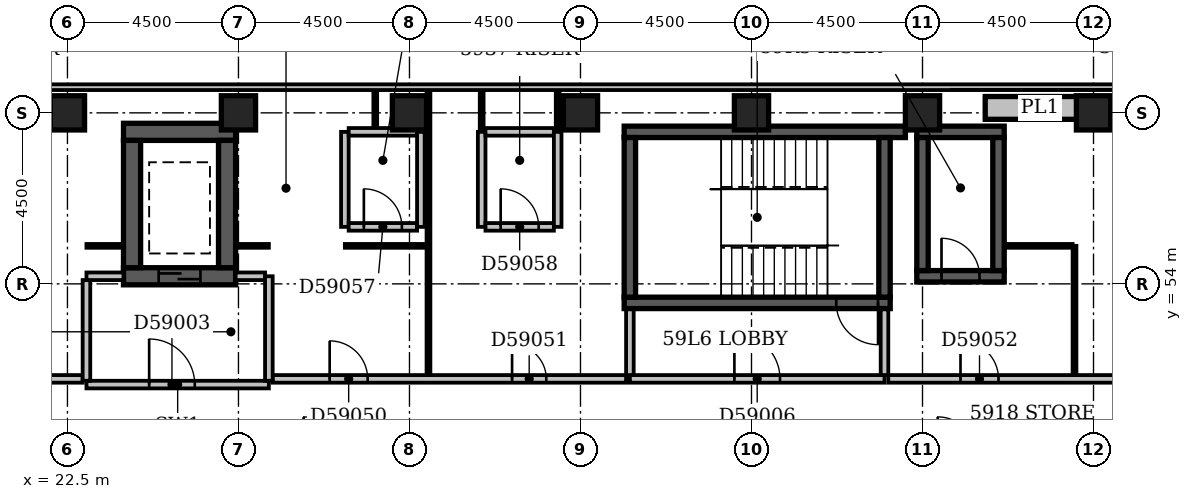
"""IFC4 building model, lengths in metres.
Left out: names, types, materials, properties, quantities, classifications, styles, units other than length and angle.
Written with IfcOpenShell. Run it as: python <this file> out.ifc"""

import sys

from ifc_helpers import new_model, si_unit, direction, frame, frame_2d, origin, origin_2d, place, context, subcontext, project, spatial, rectangle, extrude, element, fill, save


model = new_model("IFC4")
c1 = context("Model", 3, precision=1e-05, world=origin(), true_north=direction((0.0, 1.0)))
c2 = subcontext(c1, "Body", "Model", "MODEL_VIEW")
j1 = project(units=[si_unit("LENGTHUNIT", "METRE"), si_unit("PLANEANGLEUNIT", "RADIAN")], contexts=[c1])
p1 = place(None, origin())
s1 = spatial("IfcSite", under=j1, at=p1, CompositionType="ELEMENT")
p2 = place(p1, origin())
s2 = spatial("IfcBuilding", under=s1, at=p2, CompositionType="ELEMENT")
p3 = place(p2, frame((0.0, 0.0, 229.4)))
s3 = spatial("IfcBuildingStorey", under=s2, at=p3, CompositionType="ELEMENT", Elevation=229.4)
p4 = place(p3, frame((23.975, 54.2, -0.3), z_axis=(0.0, 0.0, 1.0), x_axis=(1.0, 0.0, 0.0)))
e1 = element("IfcWall", 1, at=p4, inside=s3, PredefinedType="SHEAR", context=c2, shape_type="SweptSolid", body=[
    extrude(rectangle(XDim=2.95, YDim=0.45, at=frame_2d((1.475, 0.0))), origin(), (0.0, 0.0, 1.0), 3.55),
])
p5 = place(p4, frame((0.925, 0.0, 0.3)))
e2 = element("IfcOpeningElement", 2, at=p5, cuts=e1, PredefinedType="OPENING", context=c2, shape_type="SweptSolid", body=[
    extrude(rectangle(XDim=1.1, YDim=2.1, at=frame_2d((0.55, 1.05))), frame((0.0, 0.237, 0.0), z_axis=(0.0, -1.0, 0.0), x_axis=(1.0, 0.0, 0.0)), (0.0, 0.0, 1.0), 0.474),
])
p6 = place(p3, frame((23.975, 58.0, -0.3), z_axis=(0.0, 0.0, 1.0), x_axis=(1.0, 0.0, 0.0)))
e3 = element("IfcWall", 3, at=p6, inside=s3, PredefinedType="SHEAR", context=c2, shape_type="SweptSolid", body=[
    extrude(rectangle(XDim=2.95, YDim=0.45, at=frame_2d((1.475, 0.0))), origin(), (0.0, 0.0, 1.0), 3.55),
])
for number, where, z_axis, x_axis in (
    (4, (24.2, 54.425, -0.3), (0.0, 0.0, 1.0), (0.0, 1.0, 0.0)),
    (5, (26.7, 54.425, -0.3), (0.0, 0.0, 1.0), (0.0, 1.0, 0.0)),
):
    element("IfcWall", number, at=place(p3, frame(where, z_axis=z_axis, x_axis=x_axis)), inside=s3, PredefinedType="SHEAR", context=c2, shape_type="SweptSolid", body=[
        extrude(rectangle(XDim=3.35, YDim=0.45, at=frame_2d((1.675, 0.0))), origin(), (0.0, 0.0, 1.0), 3.55),
    ])
p7 = place(p3, frame((37.15, 53.5, -0.3), z_axis=(0.0, 0.0, 1.0), x_axis=(1.0, 0.0, 0.0)))
e6 = element("IfcWall", 6, at=p7, inside=s3, PredefinedType="SHEAR", context=c2, shape_type="SweptSolid", body=[
    extrude(rectangle(XDim=7.0, YDim=0.3, at=frame_2d((3.5, 0.0))), origin(), (0.0, 0.0, 1.0), 3.55),
])
p8 = place(p7, frame((5.58, 0.0, 0.3)))
e7 = element("IfcOpeningElement", 7, at=p8, cuts=e6, PredefinedType="OPENING", context=c2, shape_type="SweptSolid", body=[
    extrude(rectangle(XDim=1.1, YDim=2.1, at=frame_2d((0.55, 1.05))), frame((0.0, 0.162, 0.0), z_axis=(0.0, -1.0, 0.0), x_axis=(1.0, 0.0, 0.0)), (0.0, 0.0, 1.0), 0.324),
])
p9 = place(p3, frame((37.15, 58.0, -0.3), z_axis=(0.0, 0.0, 1.0), x_axis=(1.0, 0.0, 0.0)))
e8 = element("IfcWall", 8, at=p9, inside=s3, PredefinedType="SHEAR", context=c2, shape_type="SweptSolid", body=[
    extrude(rectangle(XDim=7.4, YDim=0.3, at=frame_2d((3.7, 0.0))), origin(), (0.0, 0.0, 1.0), 3.55),
])
for number, where, z_axis, x_axis in (
    (9, (37.3, 53.65, -0.3), (0.0, 0.0, 1.0), (0.0, 1.0, 0.0)),
    (10, (44.0, 53.65, -0.3), (0.0, 0.0, 1.0), (0.0, 1.0, 0.0)),
):
    element("IfcWall", number, at=place(p3, frame(where, z_axis=z_axis, x_axis=x_axis)), inside=s3, PredefinedType="SHEAR", context=c2, shape_type="SweptSolid", body=[
        extrude(rectangle(XDim=4.2, YDim=0.3, at=frame_2d((2.1, 0.0))), origin(), (0.0, 0.0, 1.0), 3.55),
    ])
p10 = place(p3, frame((44.85, 54.2, -0.3), z_axis=(0.0, 0.0, 1.0), x_axis=(1.0, 0.0, 0.0)))
e11 = element("IfcWall", 11, at=p10, inside=s3, PredefinedType="SHEAR", context=c2, shape_type="SweptSolid", body=[
    extrude(rectangle(XDim=2.3, YDim=0.3, at=frame_2d((1.15, 0.0))), origin(), (0.0, 0.0, 1.0), 3.55),
])
p11 = place(p10, frame((0.65, 0.0, 0.3)))
e12 = element("IfcOpeningElement", 12, at=p11, cuts=e11, PredefinedType="OPENING", context=c2, shape_type="SweptSolid", body=[
    extrude(rectangle(XDim=1.0, YDim=2.1, at=frame_2d((0.5, 1.05))), frame((0.0, 0.162, 0.0), z_axis=(0.0, -1.0, 0.0), x_axis=(1.0, 0.0, 0.0)), (0.0, 0.0, 1.0), 0.324),
])
p12 = place(p3, frame((44.85, 58.0, -0.3), z_axis=(0.0, 0.0, 1.0), x_axis=(1.0, 0.0, 0.0)))
e13 = element("IfcWall", 13, at=p12, inside=s3, PredefinedType="SHEAR", context=c2, shape_type="SweptSolid", body=[
    extrude(rectangle(XDim=2.3, YDim=0.3, at=frame_2d((1.15, 0.0))), origin(), (0.0, 0.0, 1.0), 3.55),
])
for number, where, z_axis, x_axis in (
    (14, (45.0, 54.35, -0.3), (0.0, 0.0, 1.0), (0.0, 1.0, 0.0)),
    (15, (47.0, 54.35, -0.3), (0.0, 0.0, 1.0), (0.0, 1.0, 0.0)),
):
    element("IfcWall", number, at=place(p3, frame(where, z_axis=z_axis, x_axis=x_axis)), inside=s3, PredefinedType="SHEAR", context=c2, shape_type="SweptSolid", body=[
        extrude(rectangle(XDim=3.5, YDim=0.3, at=frame_2d((1.75, 0.0))), origin(), (0.0, 0.0, 1.0), 3.55),
    ])
for number, where, z_axis, x_axis in (
    (16, (22.5, 58.5, -0.3), (0.0, 0.0, 1.0), (1.0, 0.0, 0.0)),
    (17, (27.0, 58.5, -0.3), (0.0, 0.0, 1.0), (1.0, 0.0, 0.0)),
    (18, (31.5, 58.5, -0.3), (0.0, 0.0, 1.0), (1.0, 0.0, 0.0)),
    (19, (36.0, 58.5, -0.3), (0.0, 0.0, 1.0), (1.0, 0.0, 0.0)),
    (20, (40.5, 58.5, -0.3), (0.0, 0.0, 1.0), (1.0, 0.0, 0.0)),
    (21, (45.0, 58.5, -0.3), (0.0, 0.0, 1.0), (1.0, 0.0, 0.0)),
    (22, (49.5, 58.5, -0.3), (0.0, 0.0, 1.0), (1.0, 0.0, 0.0)),
):
    element("IfcColumn", number, at=place(p3, frame(where, z_axis=z_axis, x_axis=x_axis)), inside=s3, PredefinedType="COLUMN", context=c2, shape_type="SweptSolid", body=[
        extrude(rectangle(XDim=0.9, YDim=0.9, at=origin_2d()), origin(), (0.0, 0.0, 1.0), 3.55),
    ])
p13 = place(p3, frame((50.1, 59.175, 0.0), z_axis=(0.0, 0.0, 1.0), x_axis=(-1.0, 0.0, 0.0)))
e23 = element("IfcWall", 23, at=p13, inside=s3, PredefinedType="STANDARD", context=c2, shape_type="SweptSolid", body=[
    extrude(rectangle(XDim=50.85, YDim=0.15, at=frame_2d((25.425, 0.0))), origin(), (0.0, 0.0, 1.0), 2.7),
])
p14 = place(p3, frame((46.65, 58.63, 3.6), z_axis=(0.0, 0.0, 1.0), x_axis=(1.0, 0.0, 0.0)))
e24 = element("IfcWall", 24, at=p14, inside=s3, PredefinedType="STANDARD", context=c2, shape_type="SweptSolid", body=[
    extrude(rectangle(XDim=2.88, YDim=0.6, at=frame_2d((1.44, 0.0))), origin(), (0.0, 0.0, 1.0), 0.6),
])
p15 = place(p3, frame((23.0, 51.35, 0.0), z_axis=(0.0, 0.0, 1.0), x_axis=(1.0, 0.0, 0.0)))
e25 = element("IfcWall", 25, at=p15, inside=s3, PredefinedType="PARTITIONING", context=c2, shape_type="SweptSolid", body=[
    extrude(rectangle(XDim=4.8, YDim=0.2, at=frame_2d((2.4, 0.0))), origin(), (0.0, 0.0, 1.0), 3.25),
])
p16 = place(p15, frame((1.65, 0.0, 0.0)))
e26 = element("IfcOpeningElement", 26, at=p16, cuts=e25, PredefinedType="OPENING", context=c2, shape_type="SweptSolid", body=[
    extrude(rectangle(XDim=1.2, YDim=2.1, at=frame_2d((0.6, 1.05))), frame((0.0, 0.112, 0.0), z_axis=(0.0, -1.0, 0.0), x_axis=(1.0, 0.0, 0.0)), (0.0, 0.0, 1.0), 0.224),
])
p17 = place(p3, frame((27.8, 51.45, 0.0), z_axis=(0.0, 0.0, 1.0), x_axis=(0.0, 1.0, 0.0)))
e27 = element("IfcWall", 27, at=p17, inside=s3, PredefinedType="PARTITIONING", context=c2, shape_type="SweptSolid", body=[
    extrude(rectangle(XDim=2.75, YDim=0.2, at=frame_2d((1.375, 0.0))), origin(), (0.0, 0.0, 1.0), 3.25),
])
p18 = place(p3, frame((23.0, 54.2, 0.0), z_axis=(0.0, 0.0, 1.0), x_axis=(1.0, 0.0, 0.0)))
e28 = element("IfcWall", 28, at=p18, inside=s3, PredefinedType="PARTITIONING", context=c2, shape_type="SweptSolid", body=[
    extrude(rectangle(XDim=0.975, YDim=0.2, at=frame_2d((0.488, 0.0))), origin(), (0.0, 0.0, 1.0), 3.25),
])
p19 = place(p3, frame((26.925, 54.2, 0.0), z_axis=(0.0, 0.0, 1.0), x_axis=(1.0, 0.0, 0.0)))
e29 = element("IfcWall", 29, at=p19, inside=s3, PredefinedType="PARTITIONING", context=c2, shape_type="SweptSolid", body=[
    extrude(rectangle(XDim=0.775, YDim=0.2, at=frame_2d((0.387, 0.0))), origin(), (0.0, 0.0, 1.0), 3.25),
])
p20 = place(p3, frame((23.0, 51.45, 0.0), z_axis=(0.0, 0.0, 1.0), x_axis=(0.0, 1.0, 0.0)))
e30 = element("IfcWall", 30, at=p20, inside=s3, PredefinedType="PARTITIONING", context=c2, shape_type="SweptSolid", body=[
    extrude(rectangle(XDim=2.65, YDim=0.2, at=frame_2d((1.325, 0.0))), origin(), (0.0, 0.0, 1.0), 3.25),
])
p21 = place(p3, frame((37.3, 51.5, 0.0), z_axis=(0.0, 0.0, 1.0), x_axis=(1.0, 0.0, 0.0)))
e31 = element("IfcWall", 31, at=p21, inside=s3, PredefinedType="PARTITIONING", context=c2, shape_type="SweptSolid", body=[
    extrude(rectangle(XDim=6.7, YDim=0.2, at=frame_2d((3.35, 0.0))), origin(), (0.0, 0.0, 1.0), 3.25),
])
p22 = place(p21, frame((2.75, 0.0, 0.0)))
e32 = element("IfcOpeningElement", 32, at=p22, cuts=e31, PredefinedType="OPENING", context=c2, shape_type="SweptSolid", body=[
    extrude(rectangle(XDim=1.2, YDim=2.1, at=frame_2d((0.6, 1.05))), frame((0.0, 0.112, 0.0), z_axis=(0.0, -1.0, 0.0), x_axis=(1.0, 0.0, 0.0)), (0.0, 0.0, 1.0), 0.224),
])
for number, where, z_axis, x_axis in (
    (33, (44.0, 51.6, 0.0), (0.0, 0.0, 1.0), (0.0, 1.0, 0.0)),
    (34, (37.3, 51.6, 0.0), (0.0, 0.0, 1.0), (0.0, 1.0, 0.0)),
):
    element("IfcWall", number, at=place(p3, frame(where, z_axis=z_axis, x_axis=x_axis)), inside=s3, PredefinedType="PARTITIONING", context=c2, shape_type="SweptSolid", body=[
        extrude(rectangle(XDim=1.73, YDim=0.2, at=frame_2d((0.865, 0.0))), origin(), (0.0, 0.0, 1.0), 3.25),
    ])
p23 = place(p3, frame((7.6, 51.5, 0.0), z_axis=(0.0, 0.0, 1.0), x_axis=(1.0, 0.0, 0.0)))
e35 = element("IfcWall", 35, at=p23, inside=s3, PredefinedType="PARTITIONING", context=c2, shape_type="SweptSolid", body=[
    extrude(rectangle(XDim=15.3, YDim=0.2, at=frame_2d((7.65, 0.0))), origin(), (0.0, 0.0, 1.0), 3.25),
])
p24 = place(p23, frame((3.55, 0.0, 0.0)))
e36 = element("IfcOpeningElement", 36, at=p24, cuts=e35, PredefinedType="OPENING", context=c2, shape_type="SweptSolid", body=[
    extrude(rectangle(XDim=0.9, YDim=2.1, at=frame_2d((0.45, 1.05))), frame((0.0, 0.112, 0.0), z_axis=(0.0, -1.0, 0.0), x_axis=(1.0, 0.0, 0.0)), (0.0, 0.0, 1.0), 0.224),
])
p25 = place(p23, frame((11.3, 0.0, 0.0)))
e37 = element("IfcOpeningElement", 37, at=p25, cuts=e35, PredefinedType="OPENING", context=c2, shape_type="SweptSolid", body=[
    extrude(rectangle(XDim=0.9, YDim=2.1, at=frame_2d((0.45, 1.05))), frame((0.0, 0.112, 0.0), z_axis=(0.0, -1.0, 0.0), x_axis=(1.0, 0.0, 0.0)), (0.0, 0.0, 1.0), 0.224),
])
p26 = place(p3, frame((27.9, 51.5, 0.0), z_axis=(0.0, 0.0, 1.0), x_axis=(1.0, 0.0, 0.0)))
e38 = element("IfcWall", 38, at=p26, inside=s3, PredefinedType="PARTITIONING", context=c2, shape_type="SweptSolid", body=[
    extrude(rectangle(XDim=9.3, YDim=0.2, at=frame_2d((4.65, 0.0))), origin(), (0.0, 0.0, 1.0), 3.25),
])
p27 = place(p26, frame((1.5, 0.0, 0.0)))
e39 = element("IfcOpeningElement", 39, at=p27, cuts=e38, PredefinedType="OPENING", context=c2, shape_type="SweptSolid", body=[
    extrude(rectangle(XDim=1.0, YDim=2.1, at=frame_2d((0.5, 1.05))), frame((0.0, 0.112, 0.0), z_axis=(0.0, -1.0, 0.0), x_axis=(1.0, 0.0, 0.0)), (0.0, 0.0, 1.0), 0.224),
])
p28 = place(p26, frame((6.3, 0.0, 0.0)))
e40 = element("IfcOpeningElement", 40, at=p28, cuts=e38, PredefinedType="OPENING", context=c2, shape_type="SweptSolid", body=[
    extrude(rectangle(XDim=0.9, YDim=2.1, at=frame_2d((0.45, 1.05))), frame((0.0, 0.112, 0.0), z_axis=(0.0, -1.0, 0.0), x_axis=(1.0, 0.0, 0.0)), (0.0, 0.0, 1.0), 0.224),
])
p29 = place(p3, frame((44.1, 51.5, 0.0), z_axis=(0.0, 0.0, 1.0), x_axis=(1.0, 0.0, 0.0)))
e41 = element("IfcWall", 41, at=p29, inside=s3, PredefinedType="PARTITIONING", context=c2, shape_type="SweptSolid", body=[
    extrude(rectangle(XDim=10.5, YDim=0.2, at=frame_2d((5.25, 0.0))), origin(), (0.0, 0.0, 1.0), 3.25),
])
p30 = place(p29, frame((1.9, 0.0, 0.0)))
e42 = element("IfcOpeningElement", 42, at=p30, cuts=e41, PredefinedType="OPENING", context=c2, shape_type="SweptSolid", body=[
    extrude(rectangle(XDim=1.0, YDim=2.1, at=frame_2d((0.5, 1.05))), frame((0.0, 0.112, 0.0), z_axis=(0.0, -1.0, 0.0), x_axis=(1.0, 0.0, 0.0)), (0.0, 0.0, 1.0), 0.224),
])
p31 = place(p29, frame((6.9, 0.0, 0.0)))
e43 = element("IfcOpeningElement", 43, at=p31, cuts=e41, PredefinedType="OPENING", context=c2, shape_type="SweptSolid", body=[
    extrude(rectangle(XDim=1.0, YDim=2.1, at=frame_2d((0.5, 1.05))), frame((0.0, 0.112, 0.0), z_axis=(0.0, -1.0, 0.0), x_axis=(1.0, 0.0, 0.0)), (0.0, 0.0, 1.0), 0.224),
])
p32 = place(p3, frame((32.0, 51.6, 0.0), z_axis=(0.0, 0.0, 1.0), x_axis=(0.0, 1.0, 0.0)))
e44 = element("IfcWall", 44, at=p32, inside=s3, PredefinedType="PARTITIONING", context=c2, shape_type="SweptSolid", body=[
    extrude(rectangle(XDim=7.5, YDim=0.1, at=frame_2d((3.75, 0.0))), origin(), (0.0, 0.0, 1.0), 3.25),
])
p33 = place(p3, frame((49.0, 51.6, 0.0), z_axis=(0.0, 0.0, 1.0), x_axis=(0.0, 1.0, 0.0)))
e45 = element("IfcWall", 45, at=p33, inside=s3, PredefinedType="PARTITIONING", context=c2, shape_type="SweptSolid", body=[
    extrude(rectangle(XDim=3.4, YDim=0.1, at=frame_2d((1.7, 0.0))), origin(), (0.0, 0.0, 1.0), 3.25),
])
p34 = place(p3, frame((23.0, 55.0, 0.0), z_axis=(0.0, 0.0, 1.0), x_axis=(1.0, 0.0, 0.0)))
e46 = element("IfcWall", 46, at=p34, inside=s3, PredefinedType="PARTITIONING", context=c2, shape_type="SweptSolid", body=[
    extrude(rectangle(XDim=0.975, YDim=0.1, at=frame_2d((0.488, 0.0))), origin(), (0.0, 0.0, 1.0), 3.25),
])
p35 = place(p3, frame((26.925, 55.0, 0.0), z_axis=(0.0, 0.0, 1.0), x_axis=(1.0, 0.0, 0.0)))
e47 = element("IfcWall", 47, at=p35, inside=s3, PredefinedType="PARTITIONING", context=c2, shape_type="SweptSolid", body=[
    extrude(rectangle(XDim=0.875, YDim=0.1, at=frame_2d((0.438, 0.0))), origin(), (0.0, 0.0, 1.0), 3.25),
])
p36 = place(p3, frame((29.8, 55.0, 0.0), z_axis=(0.0, 0.0, 1.0), x_axis=(1.0, 0.0, 0.0)))
e48 = element("IfcWall", 48, at=p36, inside=s3, PredefinedType="PARTITIONING", context=c2, shape_type="SweptSolid", body=[
    extrude(rectangle(XDim=2.15, YDim=0.1, at=frame_2d((1.075, 0.0))), origin(), (0.0, 0.0, 1.0), 3.25),
])
p37 = place(p3, frame((47.15, 55.0, 0.0), z_axis=(0.0, 0.0, 1.0), x_axis=(1.0, 0.0, 0.0)))
e49 = element("IfcWall", 49, at=p37, inside=s3, PredefinedType="PARTITIONING", context=c2, shape_type="SweptSolid", body=[
    extrude(rectangle(XDim=1.8, YDim=0.1, at=frame_2d((0.9, 0.0))), origin(), (0.0, 0.0, 1.0), 3.25),
])
p38 = place(p3, frame((29.8, 55.5, 0.0), z_axis=(0.0, 0.0, 1.0), x_axis=(0.0, 1.0, 0.0)))
e50 = element("IfcWall", 50, at=p38, inside=s3, PredefinedType="PARTITIONING", context=c2, shape_type="SweptSolid", body=[
    extrude(rectangle(XDim=2.5, YDim=0.2, at=frame_2d((1.25, 0.0))), origin(), (0.0, 0.0, 1.0), 3.25),
])
p39 = place(p3, frame((29.9, 55.5, 0.0), z_axis=(0.0, 0.0, 1.0), x_axis=(1.0, 0.0, 0.0)))
e51 = element("IfcWall", 51, at=p39, inside=s3, PredefinedType="PARTITIONING", context=c2, shape_type="SweptSolid", body=[
    extrude(rectangle(XDim=1.8, YDim=0.2, at=frame_2d((0.9, 0.0))), origin(), (0.0, 0.0, 1.0), 3.25),
])
p40 = place(p39, frame((0.4, 0.0, 0.0)))
e52 = element("IfcOpeningElement", 52, at=p40, cuts=e51, PredefinedType="OPENING", context=c2, shape_type="SweptSolid", body=[
    extrude(rectangle(XDim=1.0, YDim=2.1, at=frame_2d((0.5, 1.05))), frame((0.0, 0.112, 0.0), z_axis=(0.0, -1.0, 0.0), x_axis=(1.0, 0.0, 0.0)), (0.0, 0.0, 1.0), 0.224),
])
for number, where, z_axis, x_axis in (
    (53, (31.8, 55.5, 0.0), (0.0, 0.0, 1.0), (0.0, 1.0, 0.0)),
    (54, (33.4, 55.5, 0.0), (0.0, 0.0, 1.0), (0.0, 1.0, 0.0)),
):
    element("IfcWall", number, at=place(p3, frame(where, z_axis=z_axis, x_axis=x_axis)), inside=s3, PredefinedType="PARTITIONING", context=c2, shape_type="SweptSolid", body=[
        extrude(rectangle(XDim=2.5, YDim=0.2, at=frame_2d((1.25, 0.0))), origin(), (0.0, 0.0, 1.0), 3.25),
    ])
p41 = place(p3, frame((33.5, 55.5, 0.0), z_axis=(0.0, 0.0, 1.0), x_axis=(1.0, 0.0, 0.0)))
e55 = element("IfcWall", 55, at=p41, inside=s3, PredefinedType="PARTITIONING", context=c2, shape_type="SweptSolid", body=[
    extrude(rectangle(XDim=1.8, YDim=0.2, at=frame_2d((0.9, 0.0))), origin(), (0.0, 0.0, 1.0), 3.25),
])
p42 = place(p41, frame((0.4, 0.0, 0.0)))
e56 = element("IfcOpeningElement", 56, at=p42, cuts=e55, PredefinedType="OPENING", context=c2, shape_type="SweptSolid", body=[
    extrude(rectangle(XDim=1.0, YDim=2.1, at=frame_2d((0.5, 1.05))), frame((0.0, 0.112, 0.0), z_axis=(0.0, -1.0, 0.0), x_axis=(1.0, 0.0, 0.0)), (0.0, 0.0, 1.0), 0.224),
])
p43 = place(p3, frame((35.4, 55.5, 0.0), z_axis=(0.0, 0.0, 1.0), x_axis=(0.0, 1.0, 0.0)))
e57 = element("IfcWall", 57, at=p43, inside=s3, PredefinedType="PARTITIONING", context=c2, shape_type="SweptSolid", body=[
    extrude(rectangle(XDim=2.5, YDim=0.2, at=frame_2d((1.25, 0.0))), origin(), (0.0, 0.0, 1.0), 2.35),
])
p44 = place(p3, frame((29.9, 58.0, 0.0), z_axis=(0.0, 0.0, 1.0), x_axis=(1.0, 0.0, 0.0)))
e58 = element("IfcWall", 58, at=p44, inside=s3, PredefinedType="PARTITIONING", context=c2, shape_type="SweptSolid", body=[
    extrude(rectangle(XDim=1.8, YDim=0.2, at=frame_2d((0.9, 0.0))), origin(), (0.0, 0.0, 1.0), 3.25),
])
p45 = place(p3, frame((33.4, 58.0, 0.0), z_axis=(0.0, 0.0, 1.0), x_axis=(0.0, 1.0, 0.0)))
e59 = element("IfcWall", 59, at=p45, inside=s3, PredefinedType="PARTITIONING", context=c2, shape_type="SweptSolid", body=[
    extrude(rectangle(XDim=1.1, YDim=0.1, at=frame_2d((0.55, 0.0))), origin(), (0.0, 0.0, 1.0), 3.25),
])
p46 = place(p3, frame((33.5, 58.0, 0.0), z_axis=(0.0, 0.0, 1.0), x_axis=(1.0, 0.0, 0.0)))
e60 = element("IfcWall", 60, at=p46, inside=s3, PredefinedType="PARTITIONING", context=c2, shape_type="SweptSolid", body=[
    extrude(rectangle(XDim=1.8, YDim=0.2, at=frame_2d((0.9, 0.0))), origin(), (0.0, 0.0, 1.0), 3.25),
])
p47 = place(p3, frame((35.4, 58.0, 0.0), z_axis=(0.0, 0.0, 1.0), x_axis=(0.0, 1.0, 0.0)))
e61 = element("IfcWall", 61, at=p47, inside=s3, PredefinedType="PARTITIONING", context=c2, shape_type="SweptSolid", body=[
    extrude(rectangle(XDim=1.1, YDim=0.1, at=frame_2d((0.55, 0.0))), origin(), (0.0, 0.0, 1.0), 2.35),
])
p48 = place(p3, frame((30.6, 58.1, 0.0), z_axis=(0.0, 0.0, 1.0), x_axis=(0.0, 1.0, 0.0)))
e62 = element("IfcWall", 62, at=p48, inside=s3, PredefinedType="PARTITIONING", context=c2, shape_type="SweptSolid", body=[
    extrude(rectangle(XDim=1.0, YDim=0.1, at=frame_2d((0.5, 0.0))), origin(), (0.0, 0.0, 1.0), 3.25),
])
p49 = place(p16, origin())
e63 = element("IfcDoor", 63, at=p49, inside=s3, OperationType="SINGLE_SWING_LEFT", PredefinedType="DOOR", context=c2, shape_type="SweptSolid", body=[
    extrude(rectangle(XDim=1.2, YDim=2.1, at=frame_2d((0.6, 1.05))), frame((0.0, 0.025, 0.0), z_axis=(0.0, -1.0, 0.0), x_axis=(1.0, 0.0, 0.0)), (0.0, 0.0, 1.0), 0.05),
])
fill(e26, e63)
p50 = place(p5, origin())
e64 = element("IfcDoor", 64, at=p50, inside=s3, OperationType="SLIDING_TO_LEFT", PredefinedType="DOOR", context=c2, shape_type="SweptSolid", body=[
    extrude(rectangle(XDim=1.1, YDim=2.1, at=frame_2d((0.55, 1.05))), frame((0.0, 0.025, 0.0), z_axis=(0.0, -1.0, 0.0), x_axis=(1.0, 0.0, 0.0)), (0.0, 0.0, 1.0), 0.05),
])
fill(e2, e64)
p51 = place(p22, origin())
e65 = element("IfcDoor", 65, at=p51, inside=s3, OperationType="SINGLE_SWING_LEFT", PredefinedType="DOOR", context=c2, shape_type="SweptSolid", body=[
    extrude(rectangle(XDim=1.2, YDim=2.1, at=frame_2d((0.6, 1.05))), frame((0.0, 0.025, 0.0), z_axis=(0.0, -1.0, 0.0), x_axis=(1.0, 0.0, 0.0)), (0.0, 0.0, 1.0), 0.05),
])
fill(e32, e65)
p52 = place(p11, origin())
e66 = element("IfcDoor", 66, at=p52, inside=s3, OperationType="SINGLE_SWING_LEFT", PredefinedType="DOOR", context=c2, shape_type="SweptSolid", body=[
    extrude(rectangle(XDim=1.0, YDim=2.1, at=frame_2d((0.5, 1.05))), frame((0.0, 0.025, 0.0), z_axis=(0.0, -1.0, 0.0), x_axis=(1.0, 0.0, 0.0)), (0.0, 0.0, 1.0), 0.05),
])
fill(e12, e66)
p53 = place(p8, origin())
e67 = element("IfcDoor", 67, at=p53, inside=s3, OperationType="SINGLE_SWING_RIGHT", PredefinedType="DOOR", context=c2, shape_type="SweptSolid", body=[
    extrude(rectangle(XDim=1.1, YDim=2.1, at=frame_2d((0.55, 1.05))), frame((0.0, 0.025, 0.0), z_axis=(0.0, -1.0, 0.0), x_axis=(1.0, 0.0, 0.0)), (0.0, 0.0, 1.0), 0.05),
])
fill(e7, e67)
p54 = place(p27, origin())
e68 = element("IfcDoor", 68, at=p54, inside=s3, OperationType="SINGLE_SWING_LEFT", PredefinedType="DOOR", context=c2, shape_type="SweptSolid", body=[
    extrude(rectangle(XDim=1.0, YDim=2.1, at=frame_2d((0.5, 1.05))), frame((0.0, 0.025, 0.0), z_axis=(0.0, -1.0, 0.0), x_axis=(1.0, 0.0, 0.0)), (0.0, 0.0, 1.0), 0.05),
])
fill(e39, e68)
p55 = place(p28, origin())
e69 = element("IfcDoor", 69, at=p55, inside=s3, OperationType="SINGLE_SWING_LEFT", PredefinedType="DOOR", context=c2, shape_type="SweptSolid", body=[
    extrude(rectangle(XDim=0.9, YDim=2.1, at=frame_2d((0.45, 1.05))), frame((0.0, 0.025, 0.0), z_axis=(0.0, -1.0, 0.0), x_axis=(1.0, 0.0, 0.0)), (0.0, 0.0, 1.0), 0.05),
])
fill(e40, e69)
p56 = place(p30, origin())
e70 = element("IfcDoor", 70, at=p56, inside=s3, OperationType="SINGLE_SWING_LEFT", PredefinedType="DOOR", context=c2, shape_type="SweptSolid", body=[
    extrude(rectangle(XDim=1.0, YDim=2.1, at=frame_2d((0.5, 1.05))), frame((0.0, 0.025, 0.0), z_axis=(0.0, -1.0, 0.0), x_axis=(1.0, 0.0, 0.0)), (0.0, 0.0, 1.0), 0.05),
])
fill(e42, e70)
p57 = place(p40, origin())
e71 = element("IfcDoor", 71, at=p57, inside=s3, OperationType="SINGLE_SWING_LEFT", PredefinedType="DOOR", context=c2, shape_type="SweptSolid", body=[
    extrude(rectangle(XDim=1.0, YDim=2.1, at=frame_2d((0.5, 1.05))), frame((0.0, 0.025, 0.0), z_axis=(0.0, -1.0, 0.0), x_axis=(1.0, 0.0, 0.0)), (0.0, 0.0, 1.0), 0.05),
])
fill(e52, e71)
p58 = place(p42, origin())
e72 = element("IfcDoor", 72, at=p58, inside=s3, OperationType="SINGLE_SWING_LEFT", PredefinedType="DOOR", context=c2, shape_type="SweptSolid", body=[
    extrude(rectangle(XDim=1.0, YDim=2.1, at=frame_2d((0.5, 1.05))), frame((0.0, 0.025, 0.0), z_axis=(0.0, -1.0, 0.0), x_axis=(1.0, 0.0, 0.0)), (0.0, 0.0, 1.0), 0.05),
])
fill(e56, e72)
save(model, sys.argv[1])
